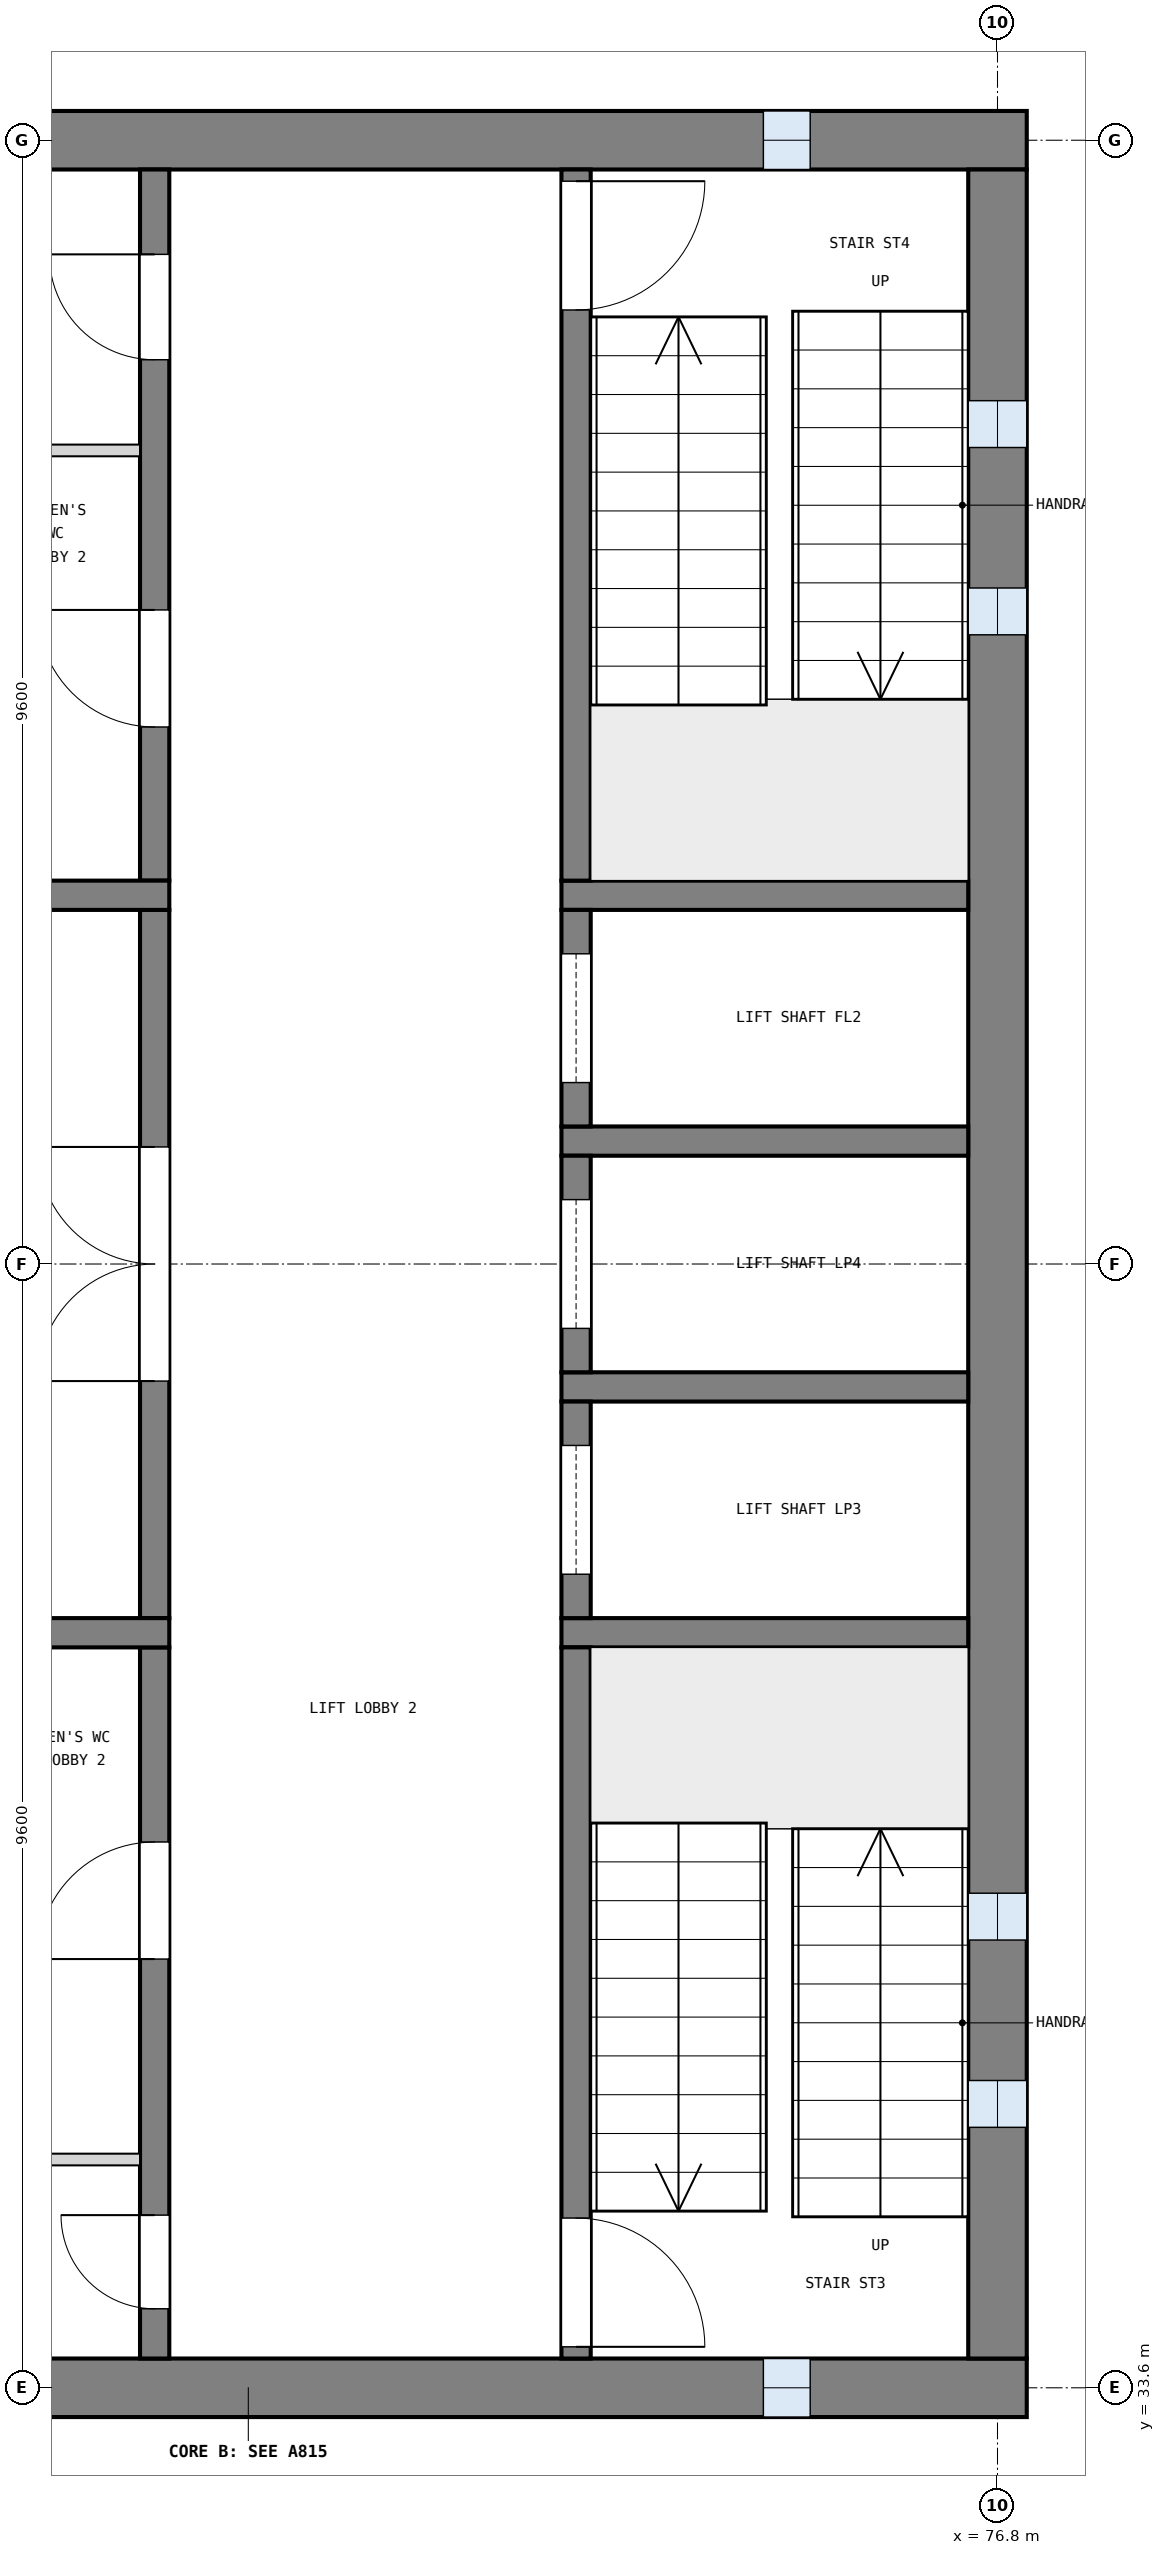
"""IFC4 building model, lengths in metres.
Left out: names, types, materials, properties, quantities, classifications, styles, units other than length and angle.
Written with IfcOpenShell. Run it as: python <this file> out.ifc"""

import sys

from ifc_helpers import new_model, si_unit, direction, frame, frame_2d, origin, place, context, subcontext, project, spatial, rectangle, extrude, element, fill, save


model = new_model("IFC4")
c1 = context("Model", 3, precision=1e-05, world=origin(), true_north=direction((0.0, 1.0)))
c2 = subcontext(c1, "Body", "Model", "MODEL_VIEW")
j1 = project(units=[si_unit("LENGTHUNIT", "METRE"), si_unit("PLANEANGLEUNIT", "RADIAN")], contexts=[c1])
p1 = place(None, origin())
s1 = spatial("IfcSite", under=j1, at=p1, CompositionType="ELEMENT")
p2 = place(p1, origin())
s2 = spatial("IfcBuilding", under=s1, at=p2, CompositionType="ELEMENT")
p3 = place(p2, frame((0.0, 0.0, 52.2)))
s3 = spatial("IfcBuildingStorey", under=s2, at=p3, CompositionType="ELEMENT", Elevation=52.2)
p4 = place(p3, frame((63.75, 52.8, 0.0), z_axis=(0.0, 0.0, 1.0), x_axis=(1.0, 0.0, 0.0)))
e1 = element("IfcWall", 1, at=p4, inside=s3, PredefinedType="SHEAR", context=c2, shape_type="SweptSolid", body=[
    extrude(rectangle(XDim=13.3, YDim=0.5, at=frame_2d((6.65, 0.0))), origin(), (0.0, 0.0, 1.0), 3.9),
])
p5 = place(p4, frame((11.05, 0.0, 1.0)))
e2 = element("IfcOpeningElement", 2, at=p5, cuts=e1, PredefinedType="OPENING", context=c2, shape_type="SweptSolid", body=[
    extrude(rectangle(XDim=0.4, YDim=2.0, at=frame_2d((0.2, 1.0))), frame((0.0, 0.26, 0.0), z_axis=(0.0, -1.0, 0.0), x_axis=(1.0, 0.0, 0.0)), (0.0, 0.0, 1.0), 0.52),
])
p6 = place(p3, frame((63.75, 33.6, 0.0), z_axis=(0.0, 0.0, 1.0), x_axis=(1.0, 0.0, 0.0)))
e3 = element("IfcWall", 3, at=p6, inside=s3, PredefinedType="SHEAR", context=c2, shape_type="SweptSolid", body=[
    extrude(rectangle(XDim=13.3, YDim=0.5, at=frame_2d((6.65, 0.0))), origin(), (0.0, 0.0, 1.0), 3.9),
])
p7 = place(p6, frame((11.05, 0.0, 1.0)))
e4 = element("IfcOpeningElement", 4, at=p7, cuts=e3, PredefinedType="OPENING", context=c2, shape_type="SweptSolid", body=[
    extrude(rectangle(XDim=0.4, YDim=2.0, at=frame_2d((0.2, 1.0))), frame((0.0, 0.26, 0.0), z_axis=(0.0, -1.0, 0.0), x_axis=(1.0, 0.0, 0.0)), (0.0, 0.0, 1.0), 0.52),
])
p8 = place(p3, frame((76.8, 33.85, 0.0), z_axis=(0.0, 0.0, 1.0), x_axis=(0.0, 1.0, 0.0)))
e5 = element("IfcWall", 5, at=p8, inside=s3, PredefinedType="SHEAR", context=c2, shape_type="SweptSolid", body=[
    extrude(rectangle(XDim=18.7, YDim=0.5, at=frame_2d((9.35, 0.0))), origin(), (0.0, 0.0, 1.0), 3.9),
])
p9 = place(p8, frame((1.975, 0.0, 1.0)))
e6 = element("IfcOpeningElement", 6, at=p9, cuts=e5, PredefinedType="OPENING", context=c2, shape_type="SweptSolid", body=[
    extrude(rectangle(XDim=0.4, YDim=2.0, at=frame_2d((0.2, 1.0))), frame((0.0, 0.26, 0.0), z_axis=(0.0, -1.0, 0.0), x_axis=(1.0, 0.0, 0.0)), (0.0, 0.0, 1.0), 0.52),
])
p10 = place(p8, frame((3.575, 0.0, 1.0)))
e7 = element("IfcOpeningElement", 7, at=p10, cuts=e5, PredefinedType="OPENING", context=c2, shape_type="SweptSolid", body=[
    extrude(rectangle(XDim=0.4, YDim=2.0, at=frame_2d((0.2, 1.0))), frame((0.0, 0.26, 0.0), z_axis=(0.0, -1.0, 0.0), x_axis=(1.0, 0.0, 0.0)), (0.0, 0.0, 1.0), 0.52),
])
p11 = place(p8, frame((14.725, 0.0, 1.0)))
e8 = element("IfcOpeningElement", 8, at=p11, cuts=e5, PredefinedType="OPENING", context=c2, shape_type="SweptSolid", body=[
    extrude(rectangle(XDim=0.4, YDim=2.0, at=frame_2d((0.2, 1.0))), frame((0.0, 0.26, 0.0), z_axis=(0.0, -1.0, 0.0), x_axis=(1.0, 0.0, 0.0)), (0.0, 0.0, 1.0), 0.52),
])
p12 = place(p8, frame((16.325, 0.0, 1.0)))
e9 = element("IfcOpeningElement", 9, at=p12, cuts=e5, PredefinedType="OPENING", context=c2, shape_type="SweptSolid", body=[
    extrude(rectangle(XDim=0.4, YDim=2.0, at=frame_2d((0.2, 1.0))), frame((0.0, 0.26, 0.0), z_axis=(0.0, -1.0, 0.0), x_axis=(1.0, 0.0, 0.0)), (0.0, 0.0, 1.0), 0.52),
])
for number, where, z_axis, x_axis in (
    (10, (76.55, 40.05, 0.0), (0.0, 0.0, 1.0), (-1.0, 0.0, 0.0)),
    (11, (76.55, 42.15, 0.0), (0.0, 0.0, 1.0), (-1.0, 0.0, 0.0)),
    (12, (76.55, 44.25, 0.0), (0.0, 0.0, 1.0), (-1.0, 0.0, 0.0)),
    (13, (76.55, 46.35, 0.0), (0.0, 0.0, 1.0), (-1.0, 0.0, 0.0)),
):
    element("IfcWall", number, at=place(p3, frame(where, z_axis=z_axis, x_axis=x_axis)), inside=s3, PredefinedType="SOLIDWALL", context=c2, shape_type="SweptSolid", body=[
        extrude(rectangle(XDim=3.475, YDim=0.25, at=frame_2d((1.738, 0.0))), origin(), (0.0, 0.0, 1.0), 3.6),
    ])
p13 = place(p3, frame((73.2, 33.85, 0.0), z_axis=(0.0, 0.0, 1.0), x_axis=(0.0, 1.0, 0.0)))
e14 = element("IfcWall", 14, at=p13, inside=s3, PredefinedType="SOLIDWALL", context=c2, shape_type="SweptSolid", body=[
    extrude(rectangle(XDim=6.075, YDim=0.25, at=frame_2d((3.038, 0.0))), origin(), (0.0, 0.0, 1.0), 3.6),
])
p14 = place(p13, frame((0.1, 0.0, 0.0)))
e15 = element("IfcOpeningElement", 15, at=p14, cuts=e14, PredefinedType="OPENING", context=c2, shape_type="SweptSolid", body=[
    extrude(rectangle(XDim=1.1, YDim=2.1, at=frame_2d((0.55, 1.05))), frame((0.0, 0.135, 0.0), z_axis=(0.0, -1.0, 0.0), x_axis=(1.0, 0.0, 0.0)), (0.0, 0.0, 1.0), 0.27),
])
p15 = place(p3, frame((73.2, 40.175, 0.0), z_axis=(0.0, 0.0, 1.0), x_axis=(0.0, 1.0, 0.0)))
e16 = element("IfcWall", 16, at=p15, inside=s3, PredefinedType="SOLIDWALL", context=c2, shape_type="SweptSolid", body=[
    extrude(rectangle(XDim=1.85, YDim=0.25, at=frame_2d((0.925, 0.0))), origin(), (0.0, 0.0, 1.0), 3.6),
])
p16 = place(p15, frame((0.375, 0.0, 0.0)))
e17 = element("IfcOpeningElement", 17, at=p16, cuts=e16, PredefinedType="OPENING", context=c2, shape_type="SweptSolid", body=[
    extrude(rectangle(XDim=1.1, YDim=2.1, at=frame_2d((0.55, 1.05))), frame((0.0, 0.135, 0.0), z_axis=(0.0, -1.0, 0.0), x_axis=(1.0, 0.0, 0.0)), (0.0, 0.0, 1.0), 0.27),
])
p17 = place(p3, frame((73.2, 42.275, 0.0), z_axis=(0.0, 0.0, 1.0), x_axis=(0.0, 1.0, 0.0)))
e18 = element("IfcWall", 18, at=p17, inside=s3, PredefinedType="SOLIDWALL", context=c2, shape_type="SweptSolid", body=[
    extrude(rectangle(XDim=1.85, YDim=0.25, at=frame_2d((0.925, 0.0))), origin(), (0.0, 0.0, 1.0), 3.6),
])
p18 = place(p17, frame((0.375, 0.0, 0.0)))
e19 = element("IfcOpeningElement", 19, at=p18, cuts=e18, PredefinedType="OPENING", context=c2, shape_type="SweptSolid", body=[
    extrude(rectangle(XDim=1.1, YDim=2.1, at=frame_2d((0.55, 1.05))), frame((0.0, 0.135, 0.0), z_axis=(0.0, -1.0, 0.0), x_axis=(1.0, 0.0, 0.0)), (0.0, 0.0, 1.0), 0.27),
])
p19 = place(p3, frame((73.2, 44.375, 0.0), z_axis=(0.0, 0.0, 1.0), x_axis=(0.0, 1.0, 0.0)))
e20 = element("IfcWall", 20, at=p19, inside=s3, PredefinedType="SOLIDWALL", context=c2, shape_type="SweptSolid", body=[
    extrude(rectangle(XDim=1.85, YDim=0.25, at=frame_2d((0.925, 0.0))), origin(), (0.0, 0.0, 1.0), 3.6),
])
p20 = place(p19, frame((0.375, 0.0, 0.0)))
e21 = element("IfcOpeningElement", 21, at=p20, cuts=e20, PredefinedType="OPENING", context=c2, shape_type="SweptSolid", body=[
    extrude(rectangle(XDim=1.1, YDim=2.1, at=frame_2d((0.55, 1.05))), frame((0.0, 0.135, 0.0), z_axis=(0.0, -1.0, 0.0), x_axis=(1.0, 0.0, 0.0)), (0.0, 0.0, 1.0), 0.27),
])
p21 = place(p3, frame((73.2, 46.475, 0.0), z_axis=(0.0, 0.0, 1.0), x_axis=(0.0, 1.0, 0.0)))
e22 = element("IfcWall", 22, at=p21, inside=s3, PredefinedType="SOLIDWALL", context=c2, shape_type="SweptSolid", body=[
    extrude(rectangle(XDim=6.075, YDim=0.25, at=frame_2d((3.038, 0.0))), origin(), (0.0, 0.0, 1.0), 3.6),
])
p22 = place(p21, frame((4.875, 0.0, 0.0)))
e23 = element("IfcOpeningElement", 23, at=p22, cuts=e22, PredefinedType="OPENING", context=c2, shape_type="SweptSolid", body=[
    extrude(rectangle(XDim=1.1, YDim=2.1, at=frame_2d((0.55, 1.05))), frame((0.0, 0.135, 0.0), z_axis=(0.0, -1.0, 0.0), x_axis=(1.0, 0.0, 0.0)), (0.0, 0.0, 1.0), 0.27),
])
p23 = place(p3, frame((69.6, 33.85, 0.0), z_axis=(0.0, 0.0, 1.0), x_axis=(0.0, 1.0, 0.0)))
e24 = element("IfcWall", 24, at=p23, inside=s3, PredefinedType="SOLIDWALL", context=c2, shape_type="SweptSolid", body=[
    extrude(rectangle(XDim=6.075, YDim=0.25, at=frame_2d((3.038, 0.0))), origin(), (0.0, 0.0, 1.0), 3.6),
])
p24 = place(p23, frame((0.425, 0.0, 0.0)))
e25 = element("IfcOpeningElement", 25, at=p24, cuts=e24, PredefinedType="OPENING", context=c2, shape_type="SweptSolid", body=[
    extrude(rectangle(XDim=0.8, YDim=2.1, at=frame_2d((0.4, 1.05))), frame((0.0, 0.135, 0.0), z_axis=(0.0, -1.0, 0.0), x_axis=(1.0, 0.0, 0.0)), (0.0, 0.0, 1.0), 0.27),
])
p25 = place(p23, frame((3.413, 0.0, 0.0)))
e26 = element("IfcOpeningElement", 26, at=p25, cuts=e24, PredefinedType="OPENING", context=c2, shape_type="SweptSolid", body=[
    extrude(rectangle(XDim=1.0, YDim=2.1, at=frame_2d((0.5, 1.05))), frame((0.0, 0.135, 0.0), z_axis=(0.0, -1.0, 0.0), x_axis=(1.0, 0.0, 0.0)), (0.0, 0.0, 1.0), 0.27),
])
p26 = place(p3, frame((69.6, 40.175, 0.0), z_axis=(0.0, 0.0, 1.0), x_axis=(0.0, 1.0, 0.0)))
e27 = element("IfcWall", 27, at=p26, inside=s3, PredefinedType="SOLIDWALL", context=c2, shape_type="SweptSolid", body=[
    extrude(rectangle(XDim=6.05, YDim=0.25, at=frame_2d((3.025, 0.0))), origin(), (0.0, 0.0, 1.0), 3.6),
])
p27 = place(p26, frame((2.025, 0.0, 0.0)))
e28 = element("IfcOpeningElement", 28, at=p27, cuts=e27, PredefinedType="OPENING", context=c2, shape_type="SweptSolid", body=[
    extrude(rectangle(XDim=2.0, YDim=2.1, at=frame_2d((1.0, 1.05))), frame((0.0, 0.135, 0.0), z_axis=(0.0, -1.0, 0.0), x_axis=(1.0, 0.0, 0.0)), (0.0, 0.0, 1.0), 0.27),
])
p28 = place(p3, frame((69.6, 46.475, 0.0), z_axis=(0.0, 0.0, 1.0), x_axis=(0.0, 1.0, 0.0)))
e29 = element("IfcWall", 29, at=p28, inside=s3, PredefinedType="SOLIDWALL", context=c2, shape_type="SweptSolid", body=[
    extrude(rectangle(XDim=6.075, YDim=0.25, at=frame_2d((3.038, 0.0))), origin(), (0.0, 0.0, 1.0), 3.6),
])
p29 = place(p28, frame((1.312, 0.0, 0.0)))
e30 = element("IfcOpeningElement", 30, at=p29, cuts=e29, PredefinedType="OPENING", context=c2, shape_type="SweptSolid", body=[
    extrude(rectangle(XDim=1.0, YDim=2.1, at=frame_2d((0.5, 1.05))), frame((0.0, 0.135, 0.0), z_axis=(0.0, -1.0, 0.0), x_axis=(1.0, 0.0, 0.0)), (0.0, 0.0, 1.0), 0.27),
])
p30 = place(p28, frame((4.45, 0.0, 0.0)))
e31 = element("IfcOpeningElement", 31, at=p30, cuts=e29, PredefinedType="OPENING", context=c2, shape_type="SweptSolid", body=[
    extrude(rectangle(XDim=0.9, YDim=2.1, at=frame_2d((0.45, 1.05))), frame((0.0, 0.135, 0.0), z_axis=(0.0, -1.0, 0.0), x_axis=(1.0, 0.0, 0.0)), (0.0, 0.0, 1.0), 0.27),
])
for number, where, z_axis, x_axis in (
    (32, (69.725, 40.05, 0.0), (0.0, 0.0, 1.0), (-1.0, 0.0, 0.0)),
    (33, (69.725, 46.35, 0.0), (0.0, 0.0, 1.0), (-1.0, 0.0, 0.0)),
):
    element("IfcWall", number, at=place(p3, frame(where, z_axis=z_axis, x_axis=x_axis)), inside=s3, PredefinedType="SOLIDWALL", context=c2, shape_type="SweptSolid", body=[
        extrude(rectangle(XDim=5.475, YDim=0.25, at=frame_2d((2.738, 0.0))), origin(), (0.0, 0.0, 1.0), 3.6),
    ])
for number, where, z_axis, x_axis in (
    (34, (69.475, 35.55, 0.0), (0.0, 0.0, 1.0), (-1.0, 0.0, 0.0)),
    (35, (69.475, 50.15, 0.0), (0.0, 0.0, 1.0), (-1.0, 0.0, 0.0)),
):
    element("IfcWall", number, at=place(p3, frame(where, z_axis=z_axis, x_axis=x_axis)), inside=s3, PredefinedType="PARTITIONING", context=c2, shape_type="SweptSolid", body=[
        extrude(rectangle(XDim=5.225, YDim=0.1, at=frame_2d((2.613, 0.0))), origin(), (0.0, 0.0, 1.0), 3.6),
    ])
p31 = place(p9, origin())
e36 = element("IfcWindow", 36, at=p31, inside=s3, PartitioningType="SINGLE_PANEL", PredefinedType="WINDOW", context=c2, shape_type="SweptSolid", body=[
    extrude(rectangle(XDim=0.4, YDim=2.0, at=frame_2d((0.2, 1.0))), frame((0.0, 0.03, 0.0), z_axis=(0.0, -1.0, 0.0), x_axis=(1.0, 0.0, 0.0)), (0.0, 0.0, 1.0), 0.06),
])
fill(e6, e36)
p32 = place(p10, origin())
e37 = element("IfcWindow", 37, at=p32, inside=s3, PartitioningType="SINGLE_PANEL", PredefinedType="WINDOW", context=c2, shape_type="SweptSolid", body=[
    extrude(rectangle(XDim=0.4, YDim=2.0, at=frame_2d((0.2, 1.0))), frame((0.0, 0.03, 0.0), z_axis=(0.0, -1.0, 0.0), x_axis=(1.0, 0.0, 0.0)), (0.0, 0.0, 1.0), 0.06),
])
fill(e7, e37)
p33 = place(p11, origin())
e38 = element("IfcWindow", 38, at=p33, inside=s3, PartitioningType="SINGLE_PANEL", PredefinedType="WINDOW", context=c2, shape_type="SweptSolid", body=[
    extrude(rectangle(XDim=0.4, YDim=2.0, at=frame_2d((0.2, 1.0))), frame((0.0, 0.03, 0.0), z_axis=(0.0, -1.0, 0.0), x_axis=(1.0, 0.0, 0.0)), (0.0, 0.0, 1.0), 0.06),
])
fill(e8, e38)
p34 = place(p12, origin())
e39 = element("IfcWindow", 39, at=p34, inside=s3, PartitioningType="SINGLE_PANEL", PredefinedType="WINDOW", context=c2, shape_type="SweptSolid", body=[
    extrude(rectangle(XDim=0.4, YDim=2.0, at=frame_2d((0.2, 1.0))), frame((0.0, 0.03, 0.0), z_axis=(0.0, -1.0, 0.0), x_axis=(1.0, 0.0, 0.0)), (0.0, 0.0, 1.0), 0.06),
])
fill(e9, e39)
p35 = place(p7, origin())
e40 = element("IfcWindow", 40, at=p35, inside=s3, PartitioningType="SINGLE_PANEL", PredefinedType="WINDOW", context=c2, shape_type="SweptSolid", body=[
    extrude(rectangle(XDim=0.4, YDim=2.0, at=frame_2d((0.2, 1.0))), frame((0.0, 0.03, 0.0), z_axis=(0.0, -1.0, 0.0), x_axis=(1.0, 0.0, 0.0)), (0.0, 0.0, 1.0), 0.06),
])
fill(e4, e40)
p36 = place(p5, origin())
e41 = element("IfcWindow", 41, at=p36, inside=s3, PartitioningType="SINGLE_PANEL", PredefinedType="WINDOW", context=c2, shape_type="SweptSolid", body=[
    extrude(rectangle(XDim=0.4, YDim=2.0, at=frame_2d((0.2, 1.0))), frame((0.0, 0.03, 0.0), z_axis=(0.0, -1.0, 0.0), x_axis=(1.0, 0.0, 0.0)), (0.0, 0.0, 1.0), 0.06),
])
fill(e2, e41)
p37 = place(p14, frame((1.1, 0.0, 0.0), z_axis=(0.0, 0.0, 1.0), x_axis=(-1.0, 0.0, 0.0)))
e42 = element("IfcDoor", 42, at=p37, inside=s3, OperationType="SINGLE_SWING_RIGHT", PredefinedType="DOOR", context=c2, shape_type="SweptSolid", body=[
    extrude(rectangle(XDim=1.1, YDim=2.1, at=frame_2d((0.55, 1.05))), frame((0.0, 0.025, 0.0), z_axis=(0.0, -1.0, 0.0), x_axis=(1.0, 0.0, 0.0)), (0.0, 0.0, 1.0), 0.05),
])
fill(e15, e42)
p38 = place(p22, frame((1.1, 0.0, 0.0), z_axis=(0.0, 0.0, 1.0), x_axis=(-1.0, 0.0, 0.0)))
e43 = element("IfcDoor", 43, at=p38, inside=s3, OperationType="SINGLE_SWING_LEFT", PredefinedType="DOOR", context=c2, shape_type="SweptSolid", body=[
    extrude(rectangle(XDim=1.1, YDim=2.1, at=frame_2d((0.55, 1.05))), frame((0.0, 0.025, 0.0), z_axis=(0.0, -1.0, 0.0), x_axis=(1.0, 0.0, 0.0)), (0.0, 0.0, 1.0), 0.05),
])
fill(e23, e43)
p39 = place(p16, origin())
e44 = element("IfcDoor", 44, at=p39, inside=s3, OperationType="SLIDING_TO_LEFT", PredefinedType="DOOR", context=c2, shape_type="SweptSolid", body=[
    extrude(rectangle(XDim=1.1, YDim=2.1, at=frame_2d((0.55, 1.05))), frame((0.0, 0.025, 0.0), z_axis=(0.0, -1.0, 0.0), x_axis=(1.0, 0.0, 0.0)), (0.0, 0.0, 1.0), 0.05),
])
fill(e17, e44)
p40 = place(p18, origin())
e45 = element("IfcDoor", 45, at=p40, inside=s3, OperationType="SLIDING_TO_LEFT", PredefinedType="DOOR", context=c2, shape_type="SweptSolid", body=[
    extrude(rectangle(XDim=1.1, YDim=2.1, at=frame_2d((0.55, 1.05))), frame((0.0, 0.025, 0.0), z_axis=(0.0, -1.0, 0.0), x_axis=(1.0, 0.0, 0.0)), (0.0, 0.0, 1.0), 0.05),
])
fill(e19, e45)
p41 = place(p20, origin())
e46 = element("IfcDoor", 46, at=p41, inside=s3, OperationType="SLIDING_TO_LEFT", PredefinedType="DOOR", context=c2, shape_type="SweptSolid", body=[
    extrude(rectangle(XDim=1.1, YDim=2.1, at=frame_2d((0.55, 1.05))), frame((0.0, 0.025, 0.0), z_axis=(0.0, -1.0, 0.0), x_axis=(1.0, 0.0, 0.0)), (0.0, 0.0, 1.0), 0.05),
])
fill(e21, e46)
p42 = place(p27, origin())
e47 = element("IfcDoor", 47, at=p42, inside=s3, OperationType="DOUBLE_DOOR_SINGLE_SWING", PredefinedType="DOOR", context=c2, shape_type="SweptSolid", body=[
    extrude(rectangle(XDim=2.0, YDim=2.1, at=frame_2d((1.0, 1.05))), frame((0.0, 0.025, 0.0), z_axis=(0.0, -1.0, 0.0), x_axis=(1.0, 0.0, 0.0)), (0.0, 0.0, 1.0), 0.05),
])
fill(e28, e47)
p43 = place(p24, origin())
e48 = element("IfcDoor", 48, at=p43, inside=s3, OperationType="SINGLE_SWING_RIGHT", PredefinedType="DOOR", context=c2, shape_type="SweptSolid", body=[
    extrude(rectangle(XDim=0.8, YDim=2.1, at=frame_2d((0.4, 1.05))), frame((0.0, 0.025, 0.0), z_axis=(0.0, -1.0, 0.0), x_axis=(1.0, 0.0, 0.0)), (0.0, 0.0, 1.0), 0.05),
])
fill(e25, e48)
p44 = place(p25, origin())
e49 = element("IfcDoor", 49, at=p44, inside=s3, OperationType="SINGLE_SWING_LEFT", PredefinedType="DOOR", context=c2, shape_type="SweptSolid", body=[
    extrude(rectangle(XDim=1.0, YDim=2.1, at=frame_2d((0.5, 1.05))), frame((0.0, 0.025, 0.0), z_axis=(0.0, -1.0, 0.0), x_axis=(1.0, 0.0, 0.0)), (0.0, 0.0, 1.0), 0.05),
])
fill(e26, e49)
p45 = place(p29, origin())
e50 = element("IfcDoor", 50, at=p45, inside=s3, OperationType="SINGLE_SWING_RIGHT", PredefinedType="DOOR", context=c2, shape_type="SweptSolid", body=[
    extrude(rectangle(XDim=1.0, YDim=2.1, at=frame_2d((0.5, 1.05))), frame((0.0, 0.025, 0.0), z_axis=(0.0, -1.0, 0.0), x_axis=(1.0, 0.0, 0.0)), (0.0, 0.0, 1.0), 0.05),
])
fill(e30, e50)
p46 = place(p30, origin())
e51 = element("IfcDoor", 51, at=p46, inside=s3, OperationType="SINGLE_SWING_RIGHT", PredefinedType="DOOR", context=c2, shape_type="SweptSolid", body=[
    extrude(rectangle(XDim=0.9, YDim=2.1, at=frame_2d((0.45, 1.05))), frame((0.0, 0.025, 0.0), z_axis=(0.0, -1.0, 0.0), x_axis=(1.0, 0.0, 0.0)), (0.0, 0.0, 1.0), 0.05),
])
fill(e31, e51)
save(model, sys.argv[1])
